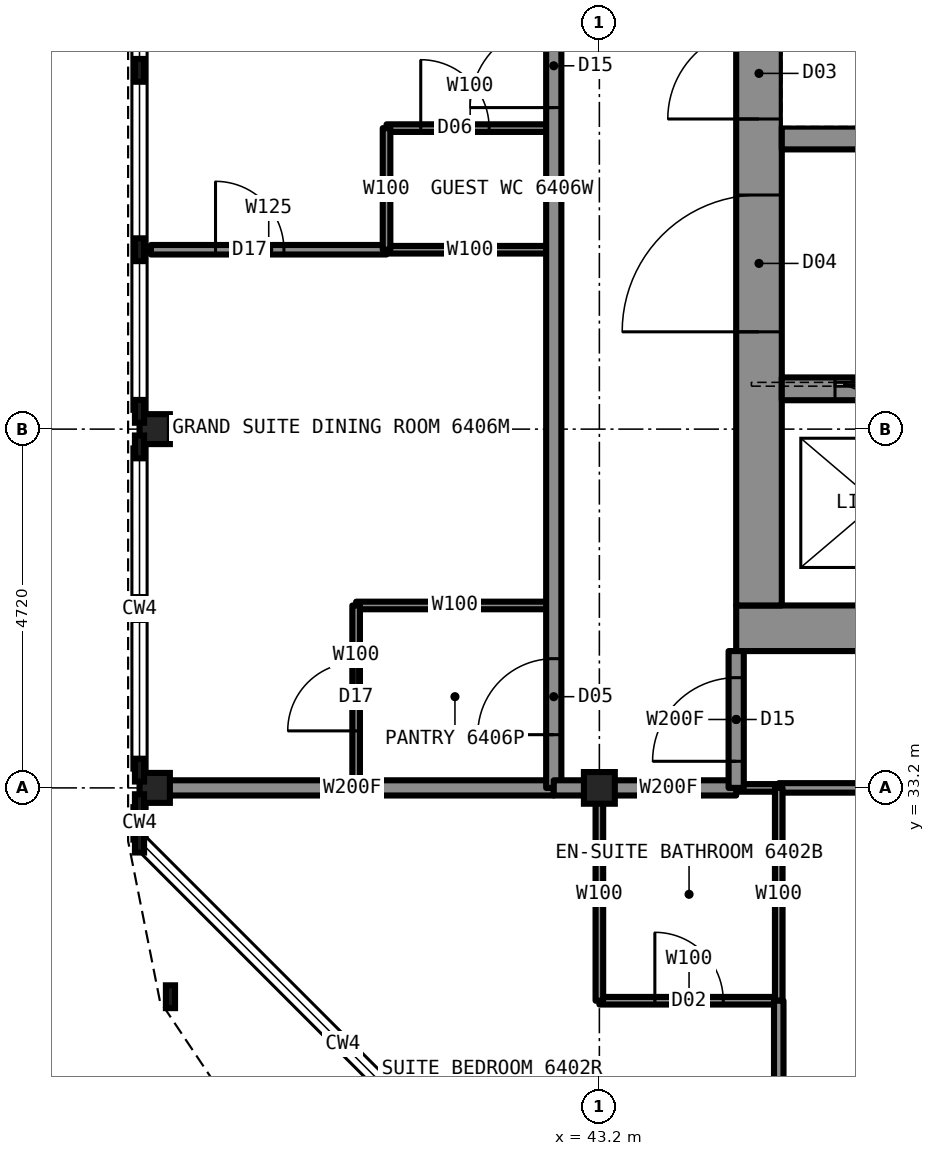
"""IFC4 building model, lengths in metres.
Left out: names, types, materials, properties, quantities, classifications, styles, units other than length and angle.
Written with IfcOpenShell. Run it as: python <this file> out.ifc"""

import sys

from ifc_helpers import new_model, si_unit, direction, frame, frame_2d, origin, origin_2d, place, context, subcontext, project, spatial, rectangle, i_section, extrude, element, fill, save


model = new_model("IFC4")
c1 = context("Model", 3, precision=1e-05, world=origin(), true_north=direction((0.0, 1.0)))
c2 = subcontext(c1, "Body", "Model", "MODEL_VIEW")
j1 = project(units=[si_unit("LENGTHUNIT", "METRE"), si_unit("PLANEANGLEUNIT", "RADIAN")], contexts=[c1])
p1 = place(None, origin())
s1 = spatial("IfcSite", under=j1, at=p1, CompositionType="ELEMENT")
p2 = place(p1, origin())
s2 = spatial("IfcBuilding", under=s1, at=p2, CompositionType="ELEMENT")
p3 = place(p2, frame((0.0, 0.0, 237.2)))
s3 = spatial("IfcBuildingStorey", under=s2, at=p3, CompositionType="ELEMENT", Elevation=237.2)
for number, where, z_axis, x_axis in (
    (1, (37.35, 33.2, 0.0), (0.0, 0.0, 1.0), (1.0, 0.0, 0.0)),
    (2, (37.35, 37.92, 0.0), (0.0, 0.0, 1.0), (1.0, 0.0, 0.0)),
):
    element("IfcColumn", number, at=place(p3, frame(where, z_axis=z_axis, x_axis=x_axis)), inside=s3, PredefinedType="COLUMN", context=c2, shape_type="SweptSolid", body=[
        extrude(i_section(OverallWidth=0.399, OverallDepth=0.394, WebThickness=0.023, FlangeThickness=0.037, at=origin_2d()), origin(), (0.0, 0.0, 1.0), 3.5),
    ])
p4 = place(p3, frame((43.2, 33.2, 0.0), z_axis=(0.0, 0.0, 1.0), x_axis=(1.0, 0.0, 0.0)))
e3 = element("IfcColumn", 3, at=p4, inside=s3, PredefinedType="COLUMN", context=c2, shape_type="SweptSolid", body=[
    extrude(i_section(OverallWidth=0.406, OverallDepth=0.417, WebThickness=0.03, FlangeThickness=0.048, at=origin_2d()), origin(), (0.0, 0.0, 1.0), 3.5),
])
p5 = place(p3, frame((45.0, 35.3, 0.0), z_axis=(0.0, 0.0, 1.0), x_axis=(1.0, 0.0, 0.0)))
e4 = element("IfcWall", 4, at=p5, inside=s3, PredefinedType="SHEAR", context=c2, shape_type="SweptSolid", body=[
    extrude(rectangle(XDim=20.0, YDim=0.6, at=frame_2d((10.0, 0.0))), origin(), (0.0, 0.0, 1.0), 3.5),
])
p6 = place(p3, frame((45.3, 35.6, 0.0), z_axis=(0.0, 0.0, 1.0), x_axis=(0.0, 1.0, 0.0)))
e5 = element("IfcWall", 5, at=p6, inside=s3, PredefinedType="SHEAR", context=c2, shape_type="SweptSolid", body=[
    extrude(rectangle(XDim=18.8, YDim=0.6, at=frame_2d((9.4, 0.0))), origin(), (0.0, 0.0, 1.0), 3.5),
])
p7 = place(p6, frame((13.4, 0.0, 0.0)))
e6 = element("IfcOpeningElement", 6, at=p7, cuts=e5, PredefinedType="OPENING", context=c2, shape_type="SweptSolid", body=[
    extrude(rectangle(XDim=1.8, YDim=2.2, at=frame_2d((0.9, 1.1))), frame((0.0, 0.31, 0.0), z_axis=(0.0, -1.0, 0.0), x_axis=(1.0, 0.0, 0.0)), (0.0, 0.0, 1.0), 0.62),
])
p8 = place(p6, frame((3.6, 0.0, 0.0)))
e7 = element("IfcOpeningElement", 7, at=p8, cuts=e5, PredefinedType="OPENING", context=c2, shape_type="SweptSolid", body=[
    extrude(rectangle(XDim=1.8, YDim=2.2, at=frame_2d((0.9, 1.1))), frame((0.0, 0.31, 0.0), z_axis=(0.0, -1.0, 0.0), x_axis=(1.0, 0.0, 0.0)), (0.0, 0.0, 1.0), 0.62),
])
p9 = place(p6, frame((6.4, 0.0, 0.0)))
e8 = element("IfcOpeningElement", 8, at=p9, cuts=e5, PredefinedType="OPENING", context=c2, shape_type="SweptSolid", body=[
    extrude(rectangle(XDim=1.2, YDim=2.2, at=frame_2d((0.6, 1.1))), frame((0.0, 0.31, 0.0), z_axis=(0.0, -1.0, 0.0), x_axis=(1.0, 0.0, 0.0)), (0.0, 0.0, 1.0), 0.62),
])
p10 = place(p3, frame((45.6, 38.45, 0.0), z_axis=(0.0, 0.0, 1.0), x_axis=(1.0, 0.0, 0.0)))
e9 = element("IfcWall", 9, at=p10, inside=s3, PredefinedType="SHEAR", context=c2, shape_type="SweptSolid", body=[
    extrude(rectangle(XDim=18.8, YDim=0.3, at=frame_2d((9.4, 0.0))), origin(), (0.0, 0.0, 1.0), 3.5),
])
p11 = place(p10, frame((0.7, 0.0, 0.0)))
e10 = element("IfcOpeningElement", 10, at=p11, cuts=e9, PredefinedType="OPENING", context=c2, shape_type="SweptSolid", body=[
    extrude(rectangle(XDim=1.1, YDim=2.2, at=frame_2d((0.55, 1.1))), frame((0.0, 0.16, 0.0), z_axis=(0.0, -1.0, 0.0), x_axis=(1.0, 0.0, 0.0)), (0.0, 0.0, 1.0), 0.32),
])
p12 = place(p10, frame((3.4, 0.0, 0.0)))
e11 = element("IfcOpeningElement", 11, at=p12, cuts=e9, PredefinedType="OPENING", context=c2, shape_type="SweptSolid", body=[
    extrude(rectangle(XDim=1.1, YDim=2.2, at=frame_2d((0.55, 1.1))), frame((0.0, 0.16, 0.0), z_axis=(0.0, -1.0, 0.0), x_axis=(1.0, 0.0, 0.0)), (0.0, 0.0, 1.0), 0.32),
])
p13 = place(p10, frame((6.1, 0.0, 0.0)))
e12 = element("IfcOpeningElement", 12, at=p13, cuts=e9, PredefinedType="OPENING", context=c2, shape_type="SweptSolid", body=[
    extrude(rectangle(XDim=1.1, YDim=2.2, at=frame_2d((0.55, 1.1))), frame((0.0, 0.16, 0.0), z_axis=(0.0, -1.0, 0.0), x_axis=(1.0, 0.0, 0.0)), (0.0, 0.0, 1.0), 0.32),
])
p14 = place(p10, frame((8.8, 0.0, 0.0)))
e13 = element("IfcOpeningElement", 13, at=p14, cuts=e9, PredefinedType="OPENING", context=c2, shape_type="SweptSolid", body=[
    extrude(rectangle(XDim=1.1, YDim=2.2, at=frame_2d((0.55, 1.1))), frame((0.0, 0.16, 0.0), z_axis=(0.0, -1.0, 0.0), x_axis=(1.0, 0.0, 0.0)), (0.0, 0.0, 1.0), 0.32),
])
p15 = place(p3, frame((45.6, 41.75, 0.0), z_axis=(0.0, 0.0, 1.0), x_axis=(1.0, 0.0, 0.0)))
e14 = element("IfcWall", 14, at=p15, inside=s3, PredefinedType="SHEAR", context=c2, shape_type="SweptSolid", body=[
    extrude(rectangle(XDim=7.1, YDim=0.3, at=frame_2d((3.55, 0.0))), origin(), (0.0, 0.0, 1.0), 3.5),
])
p16 = place(p3, frame((45.0, 33.2, 0.0), z_axis=(0.0, 0.0, 1.0), x_axis=(1.0, 0.0, 0.0)))
e15 = element("IfcWall", 15, at=p16, inside=s3, PredefinedType="PARTITIONING", context=c2, shape_type="SweptSolid", body=[
    extrude(rectangle(XDim=0.56, YDim=0.1, at=frame_2d((0.28, 0.0))), origin(), (0.0, 0.0, 1.0), 3.33),
])
p17 = place(p3, frame((43.22, 33.2, 0.0), z_axis=(0.0, 0.0, 1.0), x_axis=(1.0, 0.0, 0.0)))
e16 = element("IfcWall", 16, at=p17, inside=s3, PredefinedType="PARTITIONING", context=c2, shape_type="SweptSolid", body=[
    extrude(rectangle(XDim=1.78, YDim=0.2, at=frame_2d((0.89, 0.0))), origin(), (0.0, 0.0, 1.0), 3.33),
])
p18 = place(p3, frame((37.3, 33.2, 0.0), z_axis=(0.0, 0.0, 1.0), x_axis=(1.0, 0.0, 0.0)))
e17 = element("IfcWall", 17, at=p18, inside=s3, PredefinedType="PARTITIONING", context=c2, shape_type="SweptSolid", body=[
    extrude(rectangle(XDim=5.3, YDim=0.2, at=frame_2d((2.65, 0.0))), origin(), (0.0, 0.0, 1.0), 2.573),
])
p19 = place(p3, frame((45.56, 33.2, 0.0), z_axis=(0.0, 0.0, 1.0), x_axis=(1.0, 0.0, 0.0)))
e18 = element("IfcWall", 18, at=p19, inside=s3, PredefinedType="PARTITIONING", context=c2, shape_type="SweptSolid", body=[
    extrude(rectangle(XDim=7.84, YDim=0.125, at=frame_2d((3.92, 0.0))), origin(), (0.0, 0.0, 1.0), 3.33),
])
p20 = place(p19, frame((3.49, 0.0, 0.0)))
e19 = element("IfcOpeningElement", 19, at=p20, cuts=e18, PredefinedType="OPENING", context=c2, shape_type="SweptSolid", body=[
    extrude(rectangle(XDim=0.9, YDim=2.2, at=frame_2d((0.45, 1.1))), frame((0.0, 0.073, 0.0), z_axis=(0.0, -1.0, 0.0), x_axis=(1.0, 0.0, 0.0)), (0.0, 0.0, 1.0), 0.145),
])
p21 = place(p3, frame((43.2, 30.4, 0.0), z_axis=(0.0, 0.0, 1.0), x_axis=(1.0, 0.0, 0.0)))
e20 = element("IfcWall", 20, at=p21, inside=s3, PredefinedType="PARTITIONING", context=c2, shape_type="SweptSolid", body=[
    extrude(rectangle(XDim=2.36, YDim=0.1, at=frame_2d((1.18, 0.0))), origin(), (0.0, 0.0, 1.0), 3.33),
])
p22 = place(p21, frame((0.73, 0.0, 0.0)))
e21 = element("IfcOpeningElement", 21, at=p22, cuts=e20, PredefinedType="OPENING", context=c2, shape_type="SweptSolid", body=[
    extrude(rectangle(XDim=0.9, YDim=2.1, at=frame_2d((0.45, 1.05))), frame((0.0, 0.06, 0.0), z_axis=(0.0, -1.0, 0.0), x_axis=(1.0, 0.0, 0.0)), (0.0, 0.0, 1.0), 0.12),
])
p23 = place(p3, frame((40.4, 41.88, 0.0), z_axis=(0.0, 0.0, 1.0), x_axis=(1.0, 0.0, 0.0)))
e22 = element("IfcWall", 22, at=p23, inside=s3, PredefinedType="PARTITIONING", context=c2, shape_type="SweptSolid", body=[
    extrude(rectangle(XDim=2.2, YDim=0.1, at=frame_2d((1.1, 0.0))), origin(), (0.0, 0.0, 1.0), 3.33),
])
p24 = place(p23, frame((0.45, 0.0, 0.0)))
e23 = element("IfcOpeningElement", 23, at=p24, cuts=e22, PredefinedType="OPENING", context=c2, shape_type="SweptSolid", body=[
    extrude(rectangle(XDim=0.9, YDim=2.1, at=frame_2d((0.45, 1.05))), frame((0.0, 0.06, 0.0), z_axis=(0.0, -1.0, 0.0), x_axis=(1.0, 0.0, 0.0)), (0.0, 0.0, 1.0), 0.12),
])
p25 = place(p3, frame((40.4, 40.28, 0.0), z_axis=(0.0, 0.0, 1.0), x_axis=(1.0, 0.0, 0.0)))
e24 = element("IfcWall", 24, at=p25, inside=s3, PredefinedType="PARTITIONING", context=c2, shape_type="SweptSolid", body=[
    extrude(rectangle(XDim=2.2, YDim=0.1, at=frame_2d((1.1, 0.0))), origin(), (0.0, 0.0, 1.0), 2.797),
])
p26 = place(p3, frame((37.3, 40.28, 0.0), z_axis=(0.0, 0.0, 1.0), x_axis=(1.0, 0.0, 0.0)))
e25 = element("IfcWall", 25, at=p26, inside=s3, PredefinedType="PARTITIONING", context=c2, shape_type="SweptSolid", body=[
    extrude(rectangle(XDim=3.1, YDim=0.125, at=frame_2d((1.55, 0.0))), origin(), (0.0, 0.0, 1.0), 2.797),
])
p27 = place(p26, frame((0.85, 0.0, 0.0)))
e26 = element("IfcOpeningElement", 26, at=p27, cuts=e25, PredefinedType="OPENING", context=c2, shape_type="SweptSolid", body=[
    extrude(rectangle(XDim=0.9, YDim=2.2, at=frame_2d((0.45, 1.1))), frame((0.0, 0.073, 0.0), z_axis=(0.0, -1.0, 0.0), x_axis=(1.0, 0.0, 0.0)), (0.0, 0.0, 1.0), 0.145),
])
p28 = place(p3, frame((40.0, 35.6, 0.0), z_axis=(0.0, 0.0, 1.0), x_axis=(1.0, 0.0, 0.0)))
e27 = element("IfcWall", 27, at=p28, inside=s3, PredefinedType="PARTITIONING", context=c2, shape_type="SweptSolid", body=[
    extrude(rectangle(XDim=2.6, YDim=0.1, at=frame_2d((1.3, 0.0))), origin(), (0.0, 0.0, 1.0), 2.797),
])
p29 = place(p3, frame((45.0, 33.2, 0.0), z_axis=(0.0, 0.0, 1.0), x_axis=(0.0, 1.0, 0.0)))
e28 = element("IfcWall", 28, at=p29, inside=s3, PredefinedType="PARTITIONING", context=c2, shape_type="SweptSolid", body=[
    extrude(rectangle(XDim=1.8, YDim=0.2, at=frame_2d((0.9, 0.0))), origin(), (0.0, 0.0, 1.0), 3.33),
])
p30 = place(p29, frame((0.35, 0.0, 0.0)))
e29 = element("IfcOpeningElement", 29, at=p30, cuts=e28, PredefinedType="OPENING", context=c2, shape_type="SweptSolid", body=[
    extrude(rectangle(XDim=1.1, YDim=2.2, at=frame_2d((0.55, 1.1))), frame((0.0, 0.11, 0.0), z_axis=(0.0, -1.0, 0.0), x_axis=(1.0, 0.0, 0.0)), (0.0, 0.0, 1.0), 0.22),
])
p31 = place(p3, frame((43.2, 30.4, 0.0), z_axis=(0.0, 0.0, 1.0), x_axis=(0.0, 1.0, 0.0)))
e30 = element("IfcWall", 30, at=p31, inside=s3, PredefinedType="PARTITIONING", context=c2, shape_type="SweptSolid", body=[
    extrude(rectangle(XDim=2.8, YDim=0.1, at=frame_2d((1.4, 0.0))), origin(), (0.0, 0.0, 1.0), 2.573),
])
p32 = place(p3, frame((42.6, 33.2, 0.0), z_axis=(0.0, 0.0, 1.0), x_axis=(0.0, 1.0, 0.0)))
e31 = element("IfcWall", 31, at=p32, inside=s3, PredefinedType="PARTITIONING", context=c2, shape_type="SweptSolid", body=[
    extrude(rectangle(XDim=23.6, YDim=0.2, at=frame_2d((11.8, 0.0))), origin(), (0.0, 0.0, 1.0), 3.33),
])
p33 = place(p32, frame((8.95, 0.0, 0.0)))
e32 = element("IfcOpeningElement", 32, at=p33, cuts=e31, PredefinedType="OPENING", context=c2, shape_type="SweptSolid", body=[
    extrude(rectangle(XDim=1.1, YDim=2.2, at=frame_2d((0.55, 1.1))), frame((0.0, 0.11, 0.0), z_axis=(0.0, -1.0, 0.0), x_axis=(1.0, 0.0, 0.0)), (0.0, 0.0, 1.0), 0.22),
])
p34 = place(p32, frame((0.7, 0.0, 0.0)))
e33 = element("IfcOpeningElement", 33, at=p34, cuts=e31, PredefinedType="OPENING", context=c2, shape_type="SweptSolid", body=[
    extrude(rectangle(XDim=1.0, YDim=2.1, at=frame_2d((0.5, 1.05))), frame((0.0, 0.11, 0.0), z_axis=(0.0, -1.0, 0.0), x_axis=(1.0, 0.0, 0.0)), (0.0, 0.0, 1.0), 0.22),
])
p35 = place(p3, frame((40.4, 40.28, 0.0), z_axis=(0.0, 0.0, 1.0), x_axis=(0.0, 1.0, 0.0)))
e34 = element("IfcWall", 34, at=p35, inside=s3, PredefinedType="PARTITIONING", context=c2, shape_type="SweptSolid", body=[
    extrude(rectangle(XDim=1.6, YDim=0.1, at=frame_2d((0.8, 0.0))), origin(), (0.0, 0.0, 1.0), 3.33),
])
p36 = place(p3, frame((40.0, 33.2, 0.0), z_axis=(0.0, 0.0, 1.0), x_axis=(0.0, 1.0, 0.0)))
e35 = element("IfcWall", 35, at=p36, inside=s3, PredefinedType="PARTITIONING", context=c2, shape_type="SweptSolid", body=[
    extrude(rectangle(XDim=2.4, YDim=0.1, at=frame_2d((1.2, 0.0))), origin(), (0.0, 0.0, 1.0), 3.33),
])
p37 = place(p36, frame((0.75, 0.0, 0.0)))
e36 = element("IfcOpeningElement", 36, at=p37, cuts=e35, PredefinedType="OPENING", context=c2, shape_type="SweptSolid", body=[
    extrude(rectangle(XDim=0.9, YDim=2.2, at=frame_2d((0.45, 1.1))), frame((0.0, 0.06, 0.0), z_axis=(0.0, -1.0, 0.0), x_axis=(1.0, 0.0, 0.0)), (0.0, 0.0, 1.0), 0.12),
])
p38 = place(p3, frame((45.56, 30.4, 0.0), z_axis=(0.0, 0.0, 1.0), x_axis=(0.0, 1.0, 0.0)))
e37 = element("IfcWall", 37, at=p38, inside=s3, PredefinedType="PARTITIONING", context=c2, shape_type="SweptSolid", body=[
    extrude(rectangle(XDim=2.8, YDim=0.1, at=frame_2d((1.4, 0.0))), origin(), (0.0, 0.0, 1.0), 3.33),
])
p39 = place(p3, frame((45.56, 27.3, 0.0), z_axis=(0.0, 0.0, 1.0), x_axis=(0.0, 1.0, 0.0)))
e38 = element("IfcWall", 38, at=p39, inside=s3, PredefinedType="PARTITIONING", context=c2, shape_type="SweptSolid", body=[
    extrude(rectangle(XDim=3.1, YDim=0.125, at=frame_2d((1.55, 0.0))), origin(), (0.0, 0.0, 1.0), 3.33),
])
p40 = place(p39, frame((0.95, 0.0, 0.0)))
e39 = element("IfcOpeningElement", 39, at=p40, cuts=e38, PredefinedType="OPENING", context=c2, shape_type="SweptSolid", body=[
    extrude(rectangle(XDim=0.9, YDim=2.2, at=frame_2d((0.45, 1.1))), frame((0.0, 0.073, 0.0), z_axis=(0.0, -1.0, 0.0), x_axis=(1.0, 0.0, 0.0)), (0.0, 0.0, 1.0), 0.145),
])
p41 = place(p3, frame((42.6, 33.2, 0.0), z_axis=(0.0, 0.0, 1.0), x_axis=(1.0, 0.0, 0.0)))
e40 = element("IfcWall", 40, at=p41, inside=s3, PredefinedType="PARTITIONING", context=c2, shape_type="SweptSolid", body=[
    extrude(rectangle(XDim=0.62, YDim=0.2, at=frame_2d((0.31, 0.0))), origin(), (0.0, 0.0, 1.0), 2.573),
])
p42 = place(p22, origin())
e41 = element("IfcDoor", 41, at=p42, inside=s3, OperationType="SINGLE_SWING_RIGHT", PredefinedType="DOOR", context=c2, shape_type="SweptSolid", body=[
    extrude(rectangle(XDim=0.9, YDim=2.1, at=frame_2d((0.45, 1.05))), frame((0.0, 0.025, 0.0), z_axis=(0.0, -1.0, 0.0), x_axis=(1.0, 0.0, 0.0)), (0.0, 0.0, 1.0), 0.05),
])
fill(e21, e41)
p43 = place(p30, origin())
e42 = element("IfcDoor", 42, at=p43, inside=s3, OperationType="SINGLE_SWING_LEFT", PredefinedType="DOOR", context=c2, shape_type="SweptSolid", body=[
    extrude(rectangle(XDim=1.1, YDim=2.2, at=frame_2d((0.55, 1.1))), frame((0.0, 0.025, 0.0), z_axis=(0.0, -1.0, 0.0), x_axis=(1.0, 0.0, 0.0)), (0.0, 0.0, 1.0), 0.05),
])
fill(e29, e42)
p44 = place(p33, origin())
e43 = element("IfcDoor", 43, at=p44, inside=s3, OperationType="SINGLE_SWING_LEFT", PredefinedType="DOOR", context=c2, shape_type="SweptSolid", body=[
    extrude(rectangle(XDim=1.1, YDim=2.2, at=frame_2d((0.55, 1.1))), frame((0.0, 0.025, 0.0), z_axis=(0.0, -1.0, 0.0), x_axis=(1.0, 0.0, 0.0)), (0.0, 0.0, 1.0), 0.05),
])
fill(e32, e43)
p45 = place(p27, origin())
e44 = element("IfcDoor", 44, at=p45, inside=s3, OperationType="SINGLE_SWING_LEFT", PredefinedType="DOOR", context=c2, shape_type="SweptSolid", body=[
    extrude(rectangle(XDim=0.9, YDim=2.2, at=frame_2d((0.45, 1.1))), frame((0.0, 0.025, 0.0), z_axis=(0.0, -1.0, 0.0), x_axis=(1.0, 0.0, 0.0)), (0.0, 0.0, 1.0), 0.05),
])
fill(e26, e44)
p46 = place(p37, origin())
e45 = element("IfcDoor", 45, at=p46, inside=s3, OperationType="SINGLE_SWING_LEFT", PredefinedType="DOOR", context=c2, shape_type="SweptSolid", body=[
    extrude(rectangle(XDim=0.9, YDim=2.2, at=frame_2d((0.45, 1.1))), frame((0.0, 0.025, 0.0), z_axis=(0.0, -1.0, 0.0), x_axis=(1.0, 0.0, 0.0)), (0.0, 0.0, 1.0), 0.05),
])
fill(e36, e45)
p47 = place(p34, origin())
e46 = element("IfcDoor", 46, at=p47, inside=s3, OperationType="SINGLE_SWING_LEFT", PredefinedType="DOOR", context=c2, shape_type="SweptSolid", body=[
    extrude(rectangle(XDim=1.0, YDim=2.1, at=frame_2d((0.5, 1.05))), frame((0.0, 0.025, 0.0), z_axis=(0.0, -1.0, 0.0), x_axis=(1.0, 0.0, 0.0)), (0.0, 0.0, 1.0), 0.05),
])
fill(e33, e46)
p48 = place(p24, origin())
e47 = element("IfcDoor", 47, at=p48, inside=s3, OperationType="SINGLE_SWING_LEFT", PredefinedType="DOOR", context=c2, shape_type="SweptSolid", body=[
    extrude(rectangle(XDim=0.9, YDim=2.1, at=frame_2d((0.45, 1.05))), frame((0.0, 0.025, 0.0), z_axis=(0.0, -1.0, 0.0), x_axis=(1.0, 0.0, 0.0)), (0.0, 0.0, 1.0), 0.05),
])
fill(e23, e47)
p49 = place(p8, origin())
e48 = element("IfcDoor", 48, at=p49, inside=s3, OperationType="DOUBLE_DOOR_SINGLE_SWING", PredefinedType="DOOR", context=c2, shape_type="SweptSolid", body=[
    extrude(rectangle(XDim=1.8, YDim=2.2, at=frame_2d((0.9, 1.1))), frame((0.0, 0.025, 0.0), z_axis=(0.0, -1.0, 0.0), x_axis=(1.0, 0.0, 0.0)), (0.0, 0.0, 1.0), 0.05),
])
fill(e7, e48)
p50 = place(p9, origin())
e49 = element("IfcDoor", 49, at=p50, inside=s3, OperationType="SINGLE_SWING_LEFT", PredefinedType="DOOR", context=c2, shape_type="SweptSolid", body=[
    extrude(rectangle(XDim=1.2, YDim=2.2, at=frame_2d((0.6, 1.1))), frame((0.0, 0.025, 0.0), z_axis=(0.0, -1.0, 0.0), x_axis=(1.0, 0.0, 0.0)), (0.0, 0.0, 1.0), 0.05),
])
fill(e8, e49)
p51 = place(p11, origin())
e50 = element("IfcDoor", 50, at=p51, inside=s3, OperationType="SLIDING_TO_LEFT", PredefinedType="DOOR", context=c2, shape_type="SweptSolid", body=[
    extrude(rectangle(XDim=1.1, YDim=2.2, at=frame_2d((0.55, 1.1))), frame((0.0, 0.025, 0.0), z_axis=(0.0, -1.0, 0.0), x_axis=(1.0, 0.0, 0.0)), (0.0, 0.0, 1.0), 0.05),
])
fill(e10, e50)
save(model, sys.argv[1])
